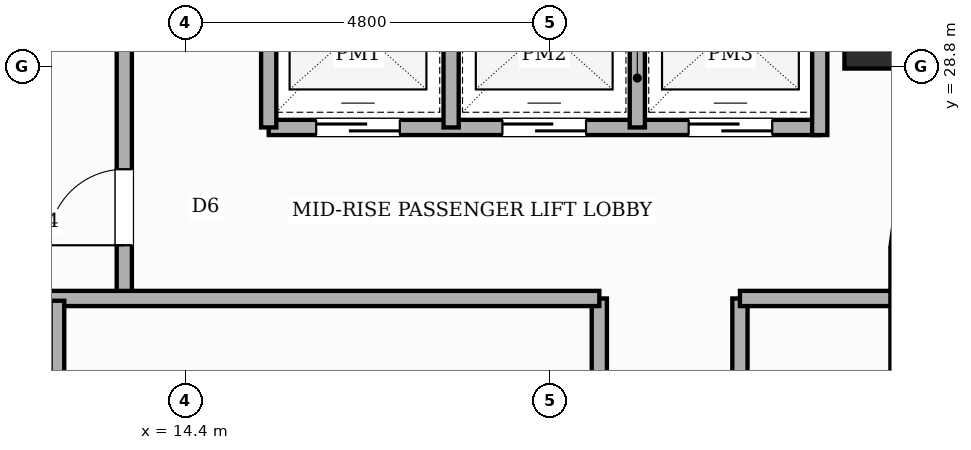
"""IFC4 building model, lengths in metres.
Left out: names, types, materials, properties, quantities, classifications, styles, units other than length and angle.
Written with IfcOpenShell. Run it as: python <this file> out.ifc"""

import sys

from ifc_helpers import new_model, si_unit, direction, frame, frame_2d, origin, origin_2d, place, context, subcontext, project, spatial, rectangle, extrude, element, fill, save


model = new_model("IFC4")
c1 = context("Model", 3, precision=1e-05, world=origin(), true_north=direction((0.0, 1.0)))
c2 = subcontext(c1, "Body", "Model", "MODEL_VIEW")
j1 = project(units=[si_unit("LENGTHUNIT", "METRE"), si_unit("PLANEANGLEUNIT", "RADIAN")], contexts=[c1])
p1 = place(None, origin())
s1 = spatial("IfcSite", under=j1, at=p1, CompositionType="ELEMENT")
p2 = place(p1, origin())
s2 = spatial("IfcBuilding", under=s1, at=p2, CompositionType="ELEMENT")
p3 = place(p2, frame((0.0, 0.0, 154.0)))
s3 = spatial("IfcBuildingStorey", under=s2, at=p3, CompositionType="ELEMENT", Elevation=154.0)
p4 = place(p3, frame((23.55, 29.25, 0.0), z_axis=(0.0, 0.0, 1.0), x_axis=(1.0, 0.0, 0.0)))
e1 = element("IfcColumn", 1, at=p4, inside=s3, PredefinedType="COLUMN", context=c2, shape_type="SweptSolid", body=[
    extrude(rectangle(XDim=0.95, YDim=0.95, at=origin_2d()), origin(), (0.0, 0.0, 1.0), 3.6),
])
p5 = place(p3, frame((23.923, 27.042, 0.0), z_axis=(0.0, 0.0, 1.0), x_axis=(-0.130555323746, -0.9914410257, 0.0)))
e2 = element("IfcWall", 2, at=p5, inside=s3, PredefinedType="STANDARD", context=c2, shape_type="SweptSolid", body=[
    extrude(rectangle(XDim=0.626, YDim=0.32, at=frame_2d((0.313, 0.0))), origin(), (0.0, 0.0, 1.0), 2.54),
])
p6 = place(p3, frame((23.84, 26.4, 0.0), z_axis=(0.0, 0.0, 1.0), x_axis=(0.0, -1.0, 0.0)))
e3 = element("IfcWall", 3, at=p6, inside=s3, PredefinedType="STANDARD", context=c2, shape_type="SweptSolid", body=[
    extrude(rectangle(XDim=14.4, YDim=0.32, at=frame_2d((7.2, 0.0))), origin(), (0.0, 0.0, 1.0), 2.54),
])
p7 = place(p6, frame((9.373, 0.0, 0.65)))
e4 = element("IfcOpeningElement", 4, at=p7, cuts=e3, PredefinedType="OPENING", context=c2, shape_type="SweptSolid", body=[
    extrude(rectangle(XDim=1.4, YDim=1.1, at=frame_2d((0.7, 0.55))), frame((0.0, 0.17, 0.0), z_axis=(0.0, -1.0, 0.0), x_axis=(1.0, 0.0, 0.0)), (0.0, 0.0, 1.0), 0.34),
])
p8 = place(p6, frame((0.903, 0.0, 0.45)))
e5 = element("IfcOpeningElement", 5, at=p8, cuts=e3, PredefinedType="OPENING", context=c2, shape_type="SweptSolid", body=[
    extrude(rectangle(XDim=0.75, YDim=1.8, at=frame_2d((0.375, 0.9))), frame((0.0, 0.17, 0.0), z_axis=(0.0, -1.0, 0.0), x_axis=(1.0, 0.0, 0.0)), (0.0, 0.0, 1.0), 0.34),
])
p9 = place(p3, frame((13.6, 25.75, 0.0), z_axis=(0.0, 0.0, 1.0), x_axis=(0.0, 1.0, 0.0)))
e6 = element("IfcWall", 6, at=p9, inside=s3, PredefinedType="POLYGONAL", context=c2, shape_type="SweptSolid", body=[
    extrude(rectangle(XDim=5.15, YDim=0.2, at=frame_2d((2.575, 0.0))), origin(), (0.0, 0.0, 1.0), 3.36),
])
p10 = place(p9, frame((0.7, 0.0, 0.0)))
e7 = element("IfcOpeningElement", 7, at=p10, cuts=e6, PredefinedType="OPENING", context=c2, shape_type="SweptSolid", body=[
    extrude(rectangle(XDim=1.0, YDim=2.15, at=frame_2d((0.5, 1.075))), frame((0.0, 0.11, 0.0), z_axis=(0.0, -1.0, 0.0), x_axis=(1.0, 0.0, 0.0)), (0.0, 0.0, 1.0), 0.22),
])
p11 = place(p3, frame((15.5, 28.0, 0.0), z_axis=(0.0, 0.0, 1.0), x_axis=(1.0, 0.0, 0.0)))
e8 = element("IfcWall", 8, at=p11, inside=s3, PredefinedType="POLYGONAL", context=c2, shape_type="SweptSolid", body=[
    extrude(rectangle(XDim=7.25, YDim=0.2, at=frame_2d((3.625, 0.0))), origin(), (0.0, 0.0, 1.0), 3.36),
])
p12 = place(p11, frame((0.625, 0.0, 0.0)))
e9 = element("IfcOpeningElement", 9, at=p12, cuts=e8, PredefinedType="OPENING", context=c2, shape_type="SweptSolid", body=[
    extrude(rectangle(XDim=1.1, YDim=2.15, at=frame_2d((0.55, 1.075))), frame((0.0, 0.11, 0.0), z_axis=(0.0, -1.0, 0.0), x_axis=(1.0, 0.0, 0.0)), (0.0, 0.0, 1.0), 0.22),
])
p13 = place(p11, frame((3.075, 0.0, 0.0)))
e10 = element("IfcOpeningElement", 10, at=p13, cuts=e8, PredefinedType="OPENING", context=c2, shape_type="SweptSolid", body=[
    extrude(rectangle(XDim=1.1, YDim=2.15, at=frame_2d((0.55, 1.075))), frame((0.0, 0.11, 0.0), z_axis=(0.0, -1.0, 0.0), x_axis=(1.0, 0.0, 0.0)), (0.0, 0.0, 1.0), 0.22),
])
p14 = place(p11, frame((5.525, 0.0, 0.0)))
e11 = element("IfcOpeningElement", 11, at=p14, cuts=e8, PredefinedType="OPENING", context=c2, shape_type="SweptSolid", body=[
    extrude(rectangle(XDim=1.1, YDim=2.15, at=frame_2d((0.55, 1.075))), frame((0.0, 0.11, 0.0), z_axis=(0.0, -1.0, 0.0), x_axis=(1.0, 0.0, 0.0)), (0.0, 0.0, 1.0), 0.22),
])
p15 = place(p3, frame((15.5, 28.0, 0.0), z_axis=(0.0, 0.0, 1.0), x_axis=(0.0, 1.0, 0.0)))
e12 = element("IfcWall", 12, at=p15, inside=s3, PredefinedType="POLYGONAL", context=c2, shape_type="SweptSolid", body=[
    extrude(rectangle(XDim=2.9, YDim=0.2, at=frame_2d((1.45, 0.0))), origin(), (0.0, 0.0, 1.0), 3.36),
])
p16 = place(p3, frame((22.75, 27.9, 0.0), z_axis=(0.0, 0.0, 1.0), x_axis=(0.0, 1.0, 0.0)))
e13 = element("IfcWall", 13, at=p16, inside=s3, PredefinedType="POLYGONAL", context=c2, shape_type="SweptSolid", body=[
    extrude(rectangle(XDim=3.0, YDim=0.2, at=frame_2d((1.5, 0.0))), origin(), (0.0, 0.0, 1.0), 3.36),
])
for number, where, z_axis, x_axis in (
    (14, (17.9, 28.0, 0.0), (0.0, 0.0, 1.0), (0.0, 1.0, 0.0)),
    (15, (20.35, 28.0, 0.0), (0.0, 0.0, 1.0), (0.0, 1.0, 0.0)),
):
    element("IfcWall", number, at=place(p3, frame(where, z_axis=z_axis, x_axis=x_axis)), inside=s3, PredefinedType="POLYGONAL", context=c2, shape_type="SweptSolid", body=[
        extrude(rectangle(XDim=2.9, YDim=0.2, at=frame_2d((1.45, 0.0))), origin(), (0.0, 0.0, 1.0), 3.36),
    ])
p17 = place(p3, frame((19.85, 9.92, 0.0), z_axis=(0.0, 0.0, 1.0), x_axis=(0.0, 1.0, 0.0)))
e16 = element("IfcWall", 16, at=p17, inside=s3, PredefinedType="PARTITIONING", context=c2, shape_type="SweptSolid", body=[
    extrude(rectangle(XDim=15.83, YDim=0.2, at=frame_2d((7.915, 0.0))), origin(), (0.0, 0.0, 1.0), 3.36),
])
p18 = place(p17, frame((0.885, 0.0, 0.0)))
e17 = element("IfcOpeningElement", 17, at=p18, cuts=e16, PredefinedType="OPENING", context=c2, shape_type="SweptSolid", body=[
    extrude(rectangle(XDim=0.98, YDim=2.18, at=frame_2d((0.49, 1.09))), frame((0.0, 0.11, 0.0), z_axis=(0.0, -1.0, 0.0), x_axis=(1.0, 0.0, 0.0)), (0.0, 0.0, 1.0), 0.22),
])
p19 = place(p17, frame((5.598, 0.0, 0.0)))
e18 = element("IfcOpeningElement", 18, at=p19, cuts=e16, PredefinedType="OPENING", context=c2, shape_type="SweptSolid", body=[
    extrude(rectangle(XDim=0.98, YDim=2.18, at=frame_2d((0.49, 1.09))), frame((0.0, 0.11, 0.0), z_axis=(0.0, -1.0, 0.0), x_axis=(1.0, 0.0, 0.0)), (0.0, 0.0, 1.0), 0.22),
])
p20 = place(p17, frame((10.88, 0.0, 0.0)))
e19 = element("IfcOpeningElement", 19, at=p20, cuts=e16, PredefinedType="OPENING", context=c2, shape_type="SweptSolid", body=[
    extrude(rectangle(XDim=0.98, YDim=2.18, at=frame_2d((0.49, 1.09))), frame((0.0, 0.11, 0.0), z_axis=(0.0, -1.0, 0.0), x_axis=(1.0, 0.0, 0.0)), (0.0, 0.0, 1.0), 0.22),
])
p21 = place(p3, frame((21.7, 9.96, 0.0), z_axis=(0.0, 0.0, 1.0), x_axis=(0.0, 1.0, 0.0)))
e20 = element("IfcWall", 20, at=p21, inside=s3, PredefinedType="PARTITIONING", context=c2, shape_type="SweptSolid", body=[
    extrude(rectangle(XDim=15.79, YDim=0.2, at=frame_2d((7.895, 0.0))), origin(), (0.0, 0.0, 1.0), 3.36),
])
p22 = place(p21, frame((2.79, 0.0, 0.0)))
e21 = element("IfcOpeningElement", 21, at=p22, cuts=e20, PredefinedType="OPENING", context=c2, shape_type="SweptSolid", body=[
    extrude(rectangle(XDim=0.95, YDim=2.15, at=frame_2d((0.475, 1.075))), frame((0.0, 0.11, 0.0), z_axis=(0.0, -1.0, 0.0), x_axis=(1.0, 0.0, 0.0)), (0.0, 0.0, 1.0), 0.22),
])
p23 = place(p21, frame((11.31, 0.0, 0.0)))
e22 = element("IfcOpeningElement", 22, at=p23, cuts=e20, PredefinedType="OPENING", context=c2, shape_type="SweptSolid", body=[
    extrude(rectangle(XDim=0.95, YDim=2.15, at=frame_2d((0.475, 1.075))), frame((0.0, 0.11, 0.0), z_axis=(0.0, -1.0, 0.0), x_axis=(1.0, 0.0, 0.0)), (0.0, 0.0, 1.0), 0.22),
])
p24 = place(p3, frame((5.12, 25.75, 0.0), z_axis=(0.0, 0.0, 1.0), x_axis=(1.0, 0.0, 0.0)))
e23 = element("IfcWall", 23, at=p24, inside=s3, PredefinedType="PARTITIONING", context=c2, shape_type="SweptSolid", body=[
    extrude(rectangle(XDim=14.73, YDim=0.2, at=frame_2d((7.365, 0.0))), origin(), (0.0, 0.0, 1.0), 3.36),
])
p25 = place(p3, frame((21.7, 25.75, 0.0), z_axis=(0.0, 0.0, 1.0), x_axis=(1.0, 0.0, 0.0)))
e24 = element("IfcWall", 24, at=p25, inside=s3, PredefinedType="PARTITIONING", context=c2, shape_type="SweptSolid", body=[
    extrude(rectangle(XDim=1.98, YDim=0.2, at=frame_2d((0.99, 0.0))), origin(), (0.0, 0.0, 1.0), 3.36),
])
p26 = place(p3, frame((12.72, 22.34, 0.0), z_axis=(0.0, 0.0, 1.0), x_axis=(0.0, 1.0, 0.0)))
e25 = element("IfcWall", 25, at=p26, inside=s3, PredefinedType="PLUMBINGWALL", context=c2, shape_type="SweptSolid", body=[
    extrude(rectangle(XDim=3.38, YDim=0.18, at=frame_2d((1.69, 0.0))), origin(), (0.0, 0.0, 1.0), 3.36),
])
p27 = place(p10, origin())
e26 = element("IfcDoor", 26, at=p27, inside=s3, OperationType="SINGLE_SWING_LEFT", PredefinedType="DOOR", context=c2, shape_type="SweptSolid", body=[
    extrude(rectangle(XDim=1.0, YDim=2.15, at=frame_2d((0.5, 1.075))), frame((0.0, 0.025, 0.0), z_axis=(0.0, -1.0, 0.0), x_axis=(1.0, 0.0, 0.0)), (0.0, 0.0, 1.0), 0.05),
])
fill(e7, e26)
p28 = place(p12, origin())
e27 = element("IfcDoor", 27, at=p28, inside=s3, OperationType="SLIDING_TO_LEFT", PredefinedType="DOOR", context=c2, shape_type="SweptSolid", body=[
    extrude(rectangle(XDim=1.1, YDim=2.15, at=frame_2d((0.55, 1.075))), frame((0.0, 0.025, 0.0), z_axis=(0.0, -1.0, 0.0), x_axis=(1.0, 0.0, 0.0)), (0.0, 0.0, 1.0), 0.05),
])
fill(e9, e27)
p29 = place(p13, origin())
e28 = element("IfcDoor", 28, at=p29, inside=s3, OperationType="SLIDING_TO_RIGHT", PredefinedType="DOOR", context=c2, shape_type="SweptSolid", body=[
    extrude(rectangle(XDim=1.1, YDim=2.15, at=frame_2d((0.55, 1.075))), frame((0.0, 0.025, 0.0), z_axis=(0.0, -1.0, 0.0), x_axis=(1.0, 0.0, 0.0)), (0.0, 0.0, 1.0), 0.05),
])
fill(e10, e28)
p30 = place(p14, origin())
e29 = element("IfcDoor", 29, at=p30, inside=s3, OperationType="SLIDING_TO_LEFT", PredefinedType="DOOR", context=c2, shape_type="SweptSolid", body=[
    extrude(rectangle(XDim=1.1, YDim=2.15, at=frame_2d((0.55, 1.075))), frame((0.0, 0.025, 0.0), z_axis=(0.0, -1.0, 0.0), x_axis=(1.0, 0.0, 0.0)), (0.0, 0.0, 1.0), 0.05),
])
fill(e11, e29)
save(model, sys.argv[1])
